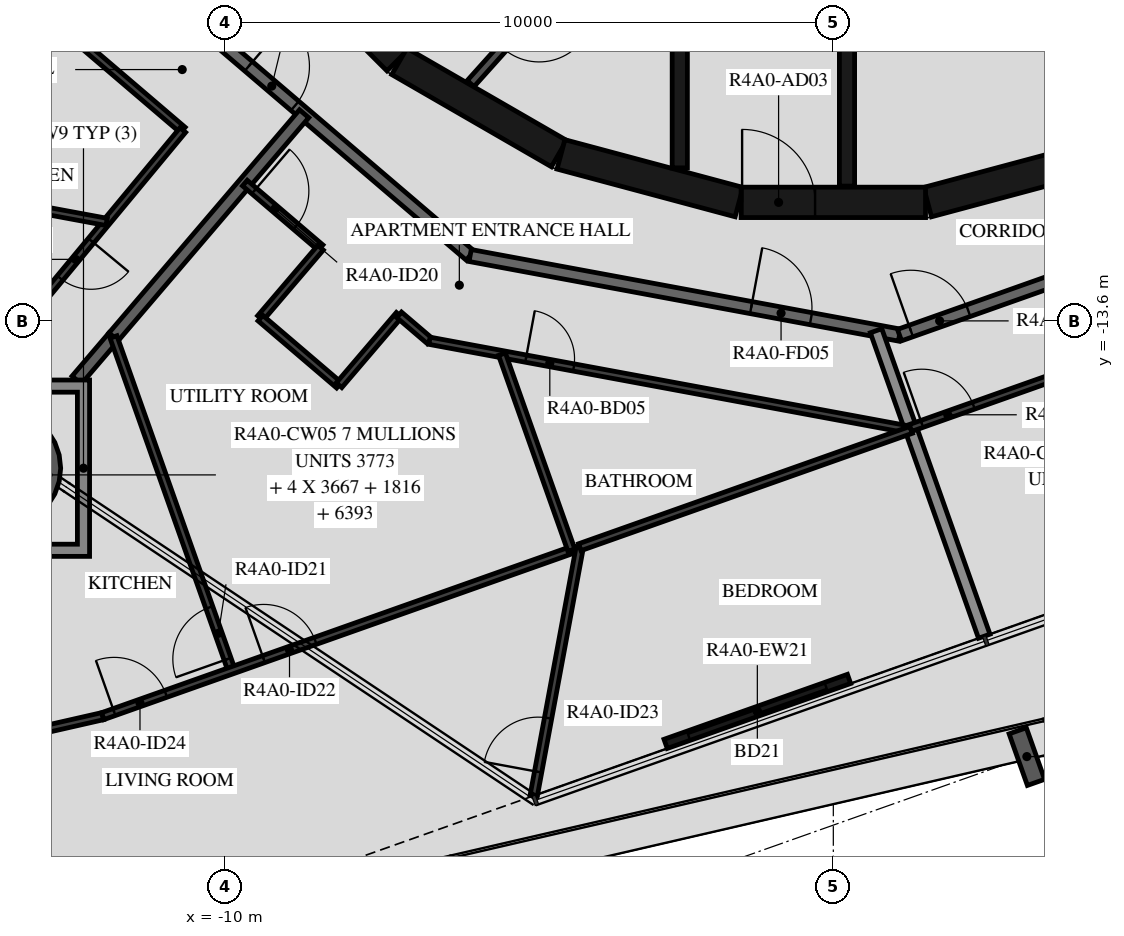
"""IFC4 building model, lengths in metres.
Left out: names, types, materials, properties, quantities, classifications, styles, units other than length and angle.
Written with IfcOpenShell. Run it as: python <this file> out.ifc"""

import sys

from ifc_helpers import new_model, si_unit, direction, frame, frame_2d, origin, origin_2d, place, context, subcontext, project, spatial, polyline, rectangle, hollow_circle, i_section, outline, extrude, element, fill, save


model = new_model("IFC4")
c1 = context("Model", 3, precision=1e-05, world=origin(), true_north=direction((0.0, 1.0)))
c2 = subcontext(c1, "Body", "Model", "MODEL_VIEW")
j1 = project(units=[si_unit("LENGTHUNIT", "METRE"), si_unit("PLANEANGLEUNIT", "RADIAN")], contexts=[c1])
p1 = place(None, origin())
s1 = spatial("IfcSite", under=j1, at=p1, CompositionType="ELEMENT")
p2 = place(p1, origin())
s2 = spatial("IfcBuilding", under=s1, at=p2, CompositionType="ELEMENT")
p3 = place(p2, frame((0.0, 0.0, 151.7)))
s3 = spatial("IfcBuildingStorey", under=s2, at=p3, CompositionType="ELEMENT", Elevation=151.7)
p4 = place(p3, frame((-13.681, -16.019, -0.45), z_axis=(0.0, 0.0, 1.0), x_axis=(1.0, 0.0, 0.0)))
e1 = element("IfcColumn", 1, at=p4, inside=s3, PredefinedType="COLUMN", context=c2, shape_type="SweptSolid", body=[
    extrude(hollow_circle(Radius=0.975, WallThickness=0.045, at=origin_2d()), origin(), (0.0, 0.0, 1.0), 3.57),
])
p5 = place(p3, frame((3.183, -20.761, -0.45), z_axis=(0.0, 0.0, 1.0), x_axis=(-0.942641392079, -0.333807138839, 0.0)))
e2 = element("IfcColumn", 2, at=p5, inside=s3, PredefinedType="COLUMN", context=c2, shape_type="SweptSolid", body=[
    extrude(i_section(OverallWidth=0.3, OverallDepth=0.9, WebThickness=0.019, FlangeThickness=0.035, FilletRadius=0.03, at=origin_2d()), origin(), (0.0, 0.0, 1.0), 3.57),
])
p6 = place(p3, frame((-2.758, -20.552, 0.0), z_axis=(0.0, 0.0, 1.0), x_axis=(0.94265323131, 0.333773704029, 0.0)))
e3 = element("IfcWall", 3, at=p6, inside=s3, PredefinedType="STANDARD", context=c2, shape_type="SweptSolid", body=[
    extrude(rectangle(XDim=3.2, YDim=0.16, at=frame_2d((1.6, 0.0))), origin(), (0.0, 0.0, 1.0), 3.12),
])
p7 = place(p6, frame((0.4, 0.0, 0.0)))
e4 = element("IfcOpeningElement", 4, at=p7, cuts=e3, PredefinedType="OPENING", context=c2, shape_type="SweptSolid", body=[
    extrude(rectangle(XDim=2.4, YDim=2.4, at=frame_2d((1.2, 1.2))), frame((0.0, 0.09, 0.0), z_axis=(0.0, -1.0, 0.0), x_axis=(1.0, 0.0, 0.0)), (0.0, 0.0, 1.0), 0.18),
])
p8 = place(p3, frame((1.55, -11.643, 0.0), z_axis=(0.0, 0.0, 1.0), x_axis=(0.965948410781, 0.258734743916, 0.0)))
e5 = element("IfcWall", 5, at=p8, inside=s3, PredefinedType="SHEAR", context=c2, shape_type="SweptSolid", body=[
    extrude(rectangle(XDim=3.033, YDim=0.5, at=frame_2d((1.516, 0.0))), origin(), (0.0, 0.0, 1.0), 3.12),
])
p9 = place(p3, frame((-9.308, -7.164, 0.0), z_axis=(0.0, 0.0, 1.0), x_axis=(0.707106781187, -0.707106781187, 0.0)))
e6 = element("IfcWall", 6, at=p9, inside=s3, PredefinedType="SHEAR", context=c2, shape_type="SweptSolid", body=[
    extrude(rectangle(XDim=3.032, YDim=0.5, at=frame_2d((1.516, 0.0))), origin(), (0.0, 0.0, 1.0), 3.12),
])
for number, where, z_axis, x_axis in (
    (7, (-7.137, -9.329, 0.0), (0.0, 0.0, 1.0), (0.866, -0.5, 0.0)),
    (8, (-4.479, -10.858, 0.0), (0.0, 0.0, 1.0), (0.966, -0.259, 0.0)),
):
    element("IfcWall", number, at=place(p3, frame(where, z_axis=z_axis, x_axis=x_axis)), inside=s3, PredefinedType="SHEAR", context=c2, shape_type="SweptSolid", body=[
        extrude(rectangle(XDim=3.033, YDim=0.5, at=frame_2d((1.516, 0.0))), origin(), (0.0, 0.0, 1.0), 3.12),
    ])
p10 = place(p3, frame((-1.516, -11.647, 0.0), z_axis=(0.0, 0.0, 1.0), x_axis=(1.0, 0.0, 0.0)))
e9 = element("IfcWall", 9, at=p10, inside=s3, PredefinedType="SHEAR", context=c2, shape_type="SweptSolid", body=[
    extrude(rectangle(XDim=3.033, YDim=0.5, at=frame_2d((1.516, 0.0))), origin(), (0.0, 0.0, 1.0), 3.12),
])
p11 = place(p10, frame((0.016, 0.0, 0.0)))
e10 = element("IfcOpeningElement", 10, at=p11, cuts=e9, PredefinedType="OPENING", context=c2, shape_type="SweptSolid", body=[
    extrude(rectangle(XDim=1.2, YDim=2.1, at=frame_2d((0.6, 1.05))), frame((0.0, 0.26, 0.0), z_axis=(0.0, -1.0, 0.0), x_axis=(1.0, 0.0, 0.0)), (0.0, 0.0, 1.0), 0.52),
])
p12 = place(p3, frame((-2.525, -8.97, 0.0), z_axis=(0.0, 0.0, 1.0), x_axis=(0.0, -1.0, 0.0)))
e11 = element("IfcWall", 11, at=p12, inside=s3, PredefinedType="SHEAR", context=c2, shape_type="SweptSolid", body=[
    extrude(rectangle(XDim=2.11, YDim=0.25, at=frame_2d((1.055, 0.0))), origin(), (0.0, 0.0, 1.0), 3.12),
])
p13 = place(p3, frame((0.225, -8.97, 0.0), z_axis=(0.0, 0.0, 1.0), x_axis=(0.0, -1.0, 0.0)))
e12 = element("IfcWall", 12, at=p13, inside=s3, PredefinedType="SHEAR", context=c2, shape_type="SweptSolid", body=[
    extrude(rectangle(XDim=2.41, YDim=0.25, at=frame_2d((1.205, 0.0))), origin(), (0.0, 0.0, 1.0), 3.12),
])
p14 = place(p3, frame((-4.311, -7.851, 0.0), z_axis=(0.0, 0.0, 1.0), x_axis=(-0.667869133096, -0.744278725383, 0.0)))
e13 = element("IfcWall", 13, at=p14, inside=s3, PredefinedType="PARTITIONING", context=c2, shape_type="SweptSolid", body=[
    extrude(rectangle(XDim=2.476, YDim=0.15, at=frame_2d((1.238, 0.0))), origin(), (0.0, 0.0, 1.0), 3.12),
])
p15 = place(p14, frame((0.788, 0.0, 0.0)))
e14 = element("IfcOpeningElement", 14, at=p15, cuts=e13, PredefinedType="OPENING", context=c2, shape_type="SweptSolid", body=[
    extrude(rectangle(XDim=0.9, YDim=2.1, at=frame_2d((0.45, 1.05))), frame((0.0, 0.085, 0.0), z_axis=(0.0, -1.0, 0.0), x_axis=(1.0, 0.0, 0.0)), (0.0, 0.0, 1.0), 0.17),
])
p16 = place(p3, frame((-11.433, -7.858, 0.0), z_axis=(0.0, 0.0, 1.0), x_axis=(0.760412154545, -0.649440801937, 0.0)))
e15 = element("IfcWall", 15, at=p16, inside=s3, PredefinedType="STANDARD", context=c2, shape_type="SweptSolid", body=[
    extrude(rectangle(XDim=7.181, YDim=0.2, at=frame_2d((3.59, 0.0))), origin(), (0.0, 0.0, 1.0), 3.12),
])
p17 = place(p16, frame((2.39, 0.0, 0.0)))
e16 = element("IfcOpeningElement", 16, at=p17, cuts=e15, PredefinedType="OPENING", context=c2, shape_type="SweptSolid", body=[
    extrude(rectangle(XDim=1.0, YDim=2.1, at=frame_2d((0.5, 1.05))), frame((0.0, 0.11, 0.0), z_axis=(0.0, -1.0, 0.0), x_axis=(1.0, 0.0, 0.0)), (0.0, 0.0, 1.0), 0.22),
])
p18 = place(p3, frame((-5.972, -12.521, 0.0), z_axis=(0.0, 0.0, 1.0), x_axis=(0.983256068163, -0.18222926335, 0.0)))
e17 = element("IfcWall", 17, at=p18, inside=s3, PredefinedType="STANDARD", context=c2, shape_type="SweptSolid", body=[
    extrude(rectangle(XDim=7.181, YDim=0.2, at=frame_2d((3.59, 0.0))), origin(), (0.0, 0.0, 1.0), 3.12),
])
p19 = place(p18, frame((4.7, 0.0, 0.0)))
e18 = element("IfcOpeningElement", 18, at=p19, cuts=e17, PredefinedType="OPENING", context=c2, shape_type="SweptSolid", body=[
    extrude(rectangle(XDim=1.0, YDim=2.1, at=frame_2d((0.5, 1.05))), frame((0.0, 0.11, 0.0), z_axis=(0.0, -1.0, 0.0), x_axis=(1.0, 0.0, 0.0)), (0.0, 0.0, 1.0), 0.22),
])
p20 = place(p3, frame((1.088, -13.83, 0.0), z_axis=(0.0, 0.0, 1.0), x_axis=(0.942648397945, 0.333787354241, 0.0)))
e19 = element("IfcWall", 19, at=p20, inside=s3, PredefinedType="STANDARD", context=c2, shape_type="SweptSolid", body=[
    extrude(rectangle(XDim=7.181, YDim=0.2, at=frame_2d((3.591, 0.0))), origin(), (0.0, 0.0, 1.0), 3.12),
])
p21 = place(p20, frame((0.2, 0.0, 0.0)))
e20 = element("IfcOpeningElement", 20, at=p21, cuts=e19, PredefinedType="OPENING", context=c2, shape_type="SweptSolid", body=[
    extrude(rectangle(XDim=1.0, YDim=2.1, at=frame_2d((0.5, 1.05))), frame((0.0, 0.11, 0.0), z_axis=(0.0, -1.0, 0.0), x_axis=(1.0, 0.0, 0.0)), (0.0, 0.0, 1.0), 0.22),
])
p22 = place(p3, frame((-11.838, -13.86, 0.0), z_axis=(0.0, 0.0, 1.0), x_axis=(0.64944503311, 0.760408540831, 0.0)))
e21 = element("IfcWall", 21, at=p22, inside=s3, PredefinedType="STANDARD", context=c2, shape_type="SweptSolid", body=[
    extrude(rectangle(XDim=4.827, YDim=0.2, at=frame_2d((2.414, 0.0))), origin(), (0.0, 0.0, 1.0), 3.12),
])
p23 = place(p3, frame((-12.443, -14.569, 0.0), z_axis=(0.0, 0.0, 1.0), x_axis=(0.649517408851, 0.760346720648, 0.0)))
e22 = element("IfcWall", 22, at=p23, inside=s3, PredefinedType="STANDARD", context=c2, shape_type="SweptSolid", body=[
    extrude(rectangle(XDim=0.932, YDim=0.2, at=frame_2d((0.466, 0.0))), origin(), (0.0, 0.0, 1.0), 3.12),
])
p24 = place(p3, frame((2.482, -18.782, 0.0), z_axis=(0.0, 0.0, 1.0), x_axis=(-0.333807281402, 0.942641341594, 0.0)))
e23 = element("IfcWall", 23, at=p24, inside=s3, PredefinedType="STANDARD", context=c2, shape_type="SweptSolid", body=[
    extrude(rectangle(XDim=5.329, YDim=0.2, at=frame_2d((2.665, 0.0))), origin(), (0.0, 0.0, 1.0), 2.73),
])
p25 = place(p3, frame((-12.713, -8.737, 0.0), z_axis=(0.0, 0.0, 1.0), x_axis=(0.760400223405, -0.649454771517, 0.0)))
e24 = element("IfcWall", 24, at=p25, inside=s3, PredefinedType="PARTITIONING", context=c2, shape_type="SweptSolid", body=[
    extrude(rectangle(XDim=2.649, YDim=0.12, at=frame_2d((1.325, 0.0))), origin(), (0.0, 0.0, 1.0), 3.12),
])
p26 = place(p3, frame((-10.698, -10.458, 0.0), z_axis=(0.0, 0.0, 1.0), x_axis=(-0.63830561059, -0.769783052223, 0.0)))
e25 = element("IfcWall", 25, at=p26, inside=s3, PredefinedType="PARTITIONING", context=c2, shape_type="SweptSolid", body=[
    extrude(rectangle(XDim=5.131, YDim=0.12, at=frame_2d((2.565, 0.0))), origin(), (0.0, 0.0, 1.0), 3.12),
])
p27 = place(p26, frame((2.363, 0.0, 0.0)))
e26 = element("IfcOpeningElement", 26, at=p27, cuts=e25, PredefinedType="OPENING", context=c2, shape_type="SweptSolid", body=[
    extrude(rectangle(XDim=0.8, YDim=2.1, at=frame_2d((0.4, 1.05))), frame((0.0, 0.07, 0.0), z_axis=(0.0, -1.0, 0.0), x_axis=(1.0, 0.0, 0.0)), (0.0, 0.0, 1.0), 0.14),
])
p28 = place(p3, frame((-14.865, -11.428, 0.0), z_axis=(0.0, 0.0, 1.0), x_axis=(0.983255224962, -0.182233812955, 0.0)))
e27 = element("IfcWall", 27, at=p28, inside=s3, PredefinedType="PARTITIONING", context=c2, shape_type="SweptSolid", body=[
    extrude(rectangle(XDim=2.963, YDim=0.12, at=frame_2d((1.482, 0.0))), origin(), (0.0, 0.0, 1.0), 3.12),
])
p29 = place(p3, frame((-9.677, -11.33, 0.0), z_axis=(0.0, 0.0, 1.0), x_axis=(0.760372142735, -0.649487647729, 0.0)))
e28 = element("IfcWall", 28, at=p29, inside=s3, PredefinedType="PARTITIONING", context=c2, shape_type="SweptSolid", body=[
    extrude(rectangle(XDim=1.636, YDim=0.12, at=frame_2d((0.818, 0.0))), origin(), (0.0, 0.0, 1.0), 3.12),
])
p30 = place(p29, frame((0.2, 0.0, 0.0)))
e29 = element("IfcOpeningElement", 29, at=p30, cuts=e28, PredefinedType="OPENING", context=c2, shape_type="SweptSolid", body=[
    extrude(rectangle(XDim=0.9, YDim=2.1, at=frame_2d((0.45, 1.05))), frame((0.0, 0.07, 0.0), z_axis=(0.0, -1.0, 0.0), x_axis=(1.0, 0.0, 0.0)), (0.0, 0.0, 1.0), 0.14),
])
p31 = place(p3, frame((-8.433, -12.393, 0.0), z_axis=(0.0, 0.0, 1.0), x_axis=(-0.649443355674, -0.760409973482, 0.0)))
e30 = element("IfcWall", 30, at=p31, inside=s3, PredefinedType="PARTITIONING", context=c2, shape_type="SweptSolid", body=[
    extrude(rectangle(XDim=1.522, YDim=0.12, at=frame_2d((0.761, 0.0))), origin(), (0.0, 0.0, 1.0), 3.12),
])
p32 = place(p3, frame((-9.422, -13.55, 0.0), z_axis=(0.0, 0.0, 1.0), x_axis=(0.760431300628, -0.649418383652, 0.0)))
e31 = element("IfcWall", 31, at=p32, inside=s3, PredefinedType="PARTITIONING", context=c2, shape_type="SweptSolid", body=[
    extrude(rectangle(XDim=1.7, YDim=0.12, at=frame_2d((0.85, 0.0))), origin(), (0.0, 0.0, 1.0), 3.12),
])
p33 = place(p3, frame((-8.129, -14.654, 0.0), z_axis=(0.0, 0.0, 1.0), x_axis=(0.649443355674, 0.760409973482, 0.0)))
e32 = element("IfcWall", 32, at=p33, inside=s3, PredefinedType="PARTITIONING", context=c2, shape_type="SweptSolid", body=[
    extrude(rectangle(XDim=1.522, YDim=0.12, at=frame_2d((0.761, 0.0))), origin(), (0.0, 0.0, 1.0), 3.12),
])
p34 = place(p3, frame((-7.14, -13.497, 0.0), z_axis=(0.0, 0.0, 1.0), x_axis=(0.760515230334, -0.649320093967, 0.0)))
e33 = element("IfcWall", 33, at=p34, inside=s3, PredefinedType="PARTITIONING", context=c2, shape_type="SweptSolid", body=[
    extrude(rectangle(XDim=0.656, YDim=0.12, at=frame_2d((0.328, 0.0))), origin(), (0.0, 0.0, 1.0), 3.12),
])
p35 = place(p3, frame((-6.641, -13.923, 0.0), z_axis=(0.0, 0.0, 1.0), x_axis=(0.983250157272, -0.182261153912, 0.0)))
e34 = element("IfcWall", 34, at=p35, inside=s3, PredefinedType="PARTITIONING", context=c2, shape_type="SweptSolid", body=[
    extrude(rectangle(XDim=7.985, YDim=0.12, at=frame_2d((3.992, 0.0))), origin(), (0.0, 0.0, 1.0), 3.12),
])
p36 = place(p35, frame((1.612, 0.0, 0.0)))
e35 = element("IfcOpeningElement", 35, at=p36, cuts=e34, PredefinedType="OPENING", context=c2, shape_type="SweptSolid", body=[
    extrude(rectangle(XDim=0.8, YDim=2.1, at=frame_2d((0.4, 1.05))), frame((0.0, 0.07, 0.0), z_axis=(0.0, -1.0, 0.0), x_axis=(1.0, 0.0, 0.0)), (0.0, 0.0, 1.0), 0.14),
])
p37 = place(p3, frame((-9.895, -19.346, 0.0), z_axis=(0.0, 0.0, 1.0), x_axis=(-0.333781129158, 0.942650602195, 0.0)))
e36 = element("IfcWall", 36, at=p37, inside=s3, PredefinedType="PARTITIONING", context=c2, shape_type="SweptSolid", body=[
    extrude(rectangle(XDim=5.819, YDim=0.12, at=frame_2d((2.91, 0.0))), origin(), (0.0, 0.0, 1.0), 3.12),
])
p38 = place(p37, frame((0.2, 0.0, 0.0)))
e37 = element("IfcOpeningElement", 37, at=p38, cuts=e36, PredefinedType="OPENING", context=c2, shape_type="SweptSolid", body=[
    extrude(rectangle(XDim=0.9, YDim=2.1, at=frame_2d((0.45, 1.05))), frame((0.0, 0.07, 0.0), z_axis=(0.0, -1.0, 0.0), x_axis=(1.0, 0.0, 0.0)), (0.0, 0.0, 1.0), 0.14),
])
p39 = place(p3, frame((-13.211, -20.369, 0.0), z_axis=(0.0, 0.0, 1.0), x_axis=(0.974997834831, 0.222214360642, 0.0)))
e38 = element("IfcWall", 38, at=p39, inside=s3, PredefinedType="PARTITIONING", context=c2, shape_type="SweptSolid", body=[
    extrude(rectangle(XDim=1.227, YDim=0.12, at=frame_2d((0.614, 0.0))), origin(), (0.0, 0.0, 1.0), 3.12),
])
p40 = place(p3, frame((-12.015, -20.096, 0.0), z_axis=(0.0, 0.0, 1.0), x_axis=(0.942638718556, 0.333814688531, 0.0)))
e39 = element("IfcWall", 39, at=p40, inside=s3, PredefinedType="PARTITIONING", context=c2, shape_type="SweptSolid", body=[
    extrude(rectangle(XDim=8.216, YDim=0.12, at=frame_2d((4.108, 0.0))), origin(), (0.0, 0.0, 1.0), 3.12),
])
p41 = place(p40, frame((2.809, 0.0, 0.0)))
e40 = element("IfcOpeningElement", 40, at=p41, cuts=e39, PredefinedType="OPENING", context=c2, shape_type="SweptSolid", body=[
    extrude(rectangle(XDim=0.9, YDim=2.1, at=frame_2d((0.45, 1.05))), frame((0.0, 0.07, 0.0), z_axis=(0.0, -1.0, 0.0), x_axis=(1.0, 0.0, 0.0)), (0.0, 0.0, 1.0), 0.14),
])
p42 = place(p40, frame((0.2, 0.0, 0.0)))
e41 = element("IfcOpeningElement", 41, at=p42, cuts=e39, PredefinedType="OPENING", context=c2, shape_type="SweptSolid", body=[
    extrude(rectangle(XDim=0.9, YDim=2.1, at=frame_2d((0.45, 1.05))), frame((0.0, 0.07, 0.0), z_axis=(0.0, -1.0, 0.0), x_axis=(1.0, 0.0, 0.0)), (0.0, 0.0, 1.0), 0.14),
])
p43 = place(p3, frame((-4.308, -17.367, 0.0), z_axis=(0.0, 0.0, 1.0), x_axis=(-0.333802202677, 0.942643140052, 0.0)))
e42 = element("IfcWall", 42, at=p43, inside=s3, PredefinedType="PARTITIONING", context=c2, shape_type="SweptSolid", body=[
    extrude(rectangle(XDim=3.419, YDim=0.12, at=frame_2d((1.709, 0.0))), origin(), (0.0, 0.0, 1.0), 3.12),
])
p44 = place(p3, frame((-4.927, -21.406, 0.0), z_axis=(0.0, 0.0, 1.0), x_axis=(0.182238575099, 0.983254342348, 0.0)))
e43 = element("IfcWall", 43, at=p44, inside=s3, PredefinedType="PARTITIONING", context=c2, shape_type="SweptSolid", body=[
    extrude(rectangle(XDim=4.157, YDim=0.12, at=frame_2d((2.079, 0.0))), origin(), (0.0, 0.0, 1.0), 3.12),
])
p45 = place(p44, frame((0.4, 0.0, 0.0)))
e44 = element("IfcOpeningElement", 44, at=p45, cuts=e43, PredefinedType="OPENING", context=c2, shape_type="SweptSolid", body=[
    extrude(rectangle(XDim=0.9, YDim=2.1, at=frame_2d((0.45, 1.05))), frame((0.0, 0.07, 0.0), z_axis=(0.0, -1.0, 0.0), x_axis=(1.0, 0.0, 0.0)), (0.0, 0.0, 1.0), 0.14),
])
p46 = place(p3, frame((-4.17, -17.318, 0.0), z_axis=(0.0, 0.0, 1.0), x_axis=(0.942641343532, 0.333807275931, 0.0)))
e45 = element("IfcWall", 45, at=p46, inside=s3, PredefinedType="PARTITIONING", context=c2, shape_type="SweptSolid", body=[
    extrude(rectangle(XDim=5.781, YDim=0.12, at=frame_2d((2.891, 0.0))), origin(), (0.0, 0.0, 1.0), 3.12),
])
p47 = place(p3, frame((1.269, -15.357, 0.0), z_axis=(0.0, 0.0, 1.0), x_axis=(0.942639442898, 0.333812643101, 0.0)))
e46 = element("IfcWall", 46, at=p47, inside=s3, PredefinedType="PARTITIONING", context=c2, shape_type="SweptSolid", body=[
    extrude(rectangle(XDim=7.86, YDim=0.12, at=frame_2d((3.93, 0.0))), origin(), (0.0, 0.0, 1.0), 3.12),
])
p48 = place(p47, frame((0.2, 0.0, 0.0)))
e47 = element("IfcOpeningElement", 47, at=p48, cuts=e46, PredefinedType="OPENING", context=c2, shape_type="SweptSolid", body=[
    extrude(rectangle(XDim=0.9, YDim=2.1, at=frame_2d((0.45, 1.05))), frame((0.0, 0.07, 0.0), z_axis=(0.0, -1.0, 0.0), x_axis=(1.0, 0.0, 0.0)), (0.0, 0.0, 1.0), 0.14),
])
p49 = place(p3, origin())
e48 = element("IfcWall", 48, at=p49, inside=s3, PredefinedType="STANDARD", context=c2, shape_type="SweptSolid", body=[
    extrude(outline(polyline([(-12.231, -14.569), (-12.231, -17.469), (-15.131, -17.469), (-15.131, -14.569), (-12.231, -14.569)]), holes=[polyline([(-14.931, -17.269), (-12.431, -17.269), (-12.431, -14.769), (-14.931, -14.769), (-14.931, -17.269)])]), origin(), (0.0, 0.0, 1.0), 3.12),
])
p50 = place(p7, origin())
e49 = element("IfcDoor", 49, at=p50, inside=s3, OperationType="DOUBLE_DOOR_SLIDING", PredefinedType="DOOR", context=c2, shape_type="SweptSolid", body=[
    extrude(rectangle(XDim=2.4, YDim=2.4, at=frame_2d((1.2, 1.2))), frame((0.0, 0.025, 0.0), z_axis=(0.0, -1.0, 0.0), x_axis=(1.0, 0.0, 0.0)), (0.0, 0.0, 1.0), 0.05),
])
fill(e4, e49)
p51 = place(p11, origin())
e50 = element("IfcDoor", 50, at=p51, inside=s3, OperationType="SINGLE_SWING_RIGHT", PredefinedType="DOOR", context=c2, shape_type="SweptSolid", body=[
    extrude(rectangle(XDim=1.2, YDim=2.1, at=frame_2d((0.6, 1.05))), frame((0.0, 0.025, 0.0), z_axis=(0.0, -1.0, 0.0), x_axis=(1.0, 0.0, 0.0)), (0.0, 0.0, 1.0), 0.05),
])
fill(e10, e50)
p52 = place(p17, origin())
e51 = element("IfcDoor", 51, at=p52, inside=s3, OperationType="SINGLE_SWING_RIGHT", PredefinedType="DOOR", context=c2, shape_type="SweptSolid", body=[
    extrude(rectangle(XDim=1.0, YDim=2.1, at=frame_2d((0.5, 1.05))), frame((0.0, 0.025, 0.0), z_axis=(0.0, -1.0, 0.0), x_axis=(1.0, 0.0, 0.0)), (0.0, 0.0, 1.0), 0.05),
])
fill(e16, e51)
p53 = place(p27, origin())
e52 = element("IfcDoor", 52, at=p53, inside=s3, OperationType="SINGLE_SWING_RIGHT", PredefinedType="DOOR", context=c2, shape_type="SweptSolid", body=[
    extrude(rectangle(XDim=0.8, YDim=2.1, at=frame_2d((0.4, 1.05))), frame((0.0, 0.025, 0.0), z_axis=(0.0, -1.0, 0.0), x_axis=(1.0, 0.0, 0.0)), (0.0, 0.0, 1.0), 0.05),
])
fill(e26, e52)
p54 = place(p19, origin())
e53 = element("IfcDoor", 53, at=p54, inside=s3, OperationType="SINGLE_SWING_LEFT", PredefinedType="DOOR", context=c2, shape_type="SweptSolid", body=[
    extrude(rectangle(XDim=1.0, YDim=2.1, at=frame_2d((0.5, 1.05))), frame((0.0, 0.025, 0.0), z_axis=(0.0, -1.0, 0.0), x_axis=(1.0, 0.0, 0.0)), (0.0, 0.0, 1.0), 0.05),
])
fill(e18, e53)
p55 = place(p30, origin())
e54 = element("IfcDoor", 54, at=p55, inside=s3, OperationType="SINGLE_SWING_LEFT", PredefinedType="DOOR", context=c2, shape_type="SweptSolid", body=[
    extrude(rectangle(XDim=0.9, YDim=2.1, at=frame_2d((0.45, 1.05))), frame((0.0, 0.025, 0.0), z_axis=(0.0, -1.0, 0.0), x_axis=(1.0, 0.0, 0.0)), (0.0, 0.0, 1.0), 0.05),
])
fill(e29, e54)
p56 = place(p36, origin())
e55 = element("IfcDoor", 55, at=p56, inside=s3, OperationType="SINGLE_SWING_LEFT", PredefinedType="DOOR", context=c2, shape_type="SweptSolid", body=[
    extrude(rectangle(XDim=0.8, YDim=2.1, at=frame_2d((0.4, 1.05))), frame((0.0, 0.025, 0.0), z_axis=(0.0, -1.0, 0.0), x_axis=(1.0, 0.0, 0.0)), (0.0, 0.0, 1.0), 0.05),
])
fill(e35, e55)
p57 = place(p38, origin())
e56 = element("IfcDoor", 56, at=p57, inside=s3, OperationType="SINGLE_SWING_LEFT", PredefinedType="DOOR", context=c2, shape_type="SweptSolid", body=[
    extrude(rectangle(XDim=0.9, YDim=2.1, at=frame_2d((0.45, 1.05))), frame((0.0, 0.025, 0.0), z_axis=(0.0, -1.0, 0.0), x_axis=(1.0, 0.0, 0.0)), (0.0, 0.0, 1.0), 0.05),
])
fill(e37, e56)
p58 = place(p41, origin())
e57 = element("IfcDoor", 57, at=p58, inside=s3, OperationType="SINGLE_SWING_LEFT", PredefinedType="DOOR", context=c2, shape_type="SweptSolid", body=[
    extrude(rectangle(XDim=0.9, YDim=2.1, at=frame_2d((0.45, 1.05))), frame((0.0, 0.025, 0.0), z_axis=(0.0, -1.0, 0.0), x_axis=(1.0, 0.0, 0.0)), (0.0, 0.0, 1.0), 0.05),
])
fill(e40, e57)
p59 = place(p45, origin())
e58 = element("IfcDoor", 58, at=p59, inside=s3, OperationType="SINGLE_SWING_RIGHT", PredefinedType="DOOR", context=c2, shape_type="SweptSolid", body=[
    extrude(rectangle(XDim=0.9, YDim=2.1, at=frame_2d((0.45, 1.05))), frame((0.0, 0.025, 0.0), z_axis=(0.0, -1.0, 0.0), x_axis=(1.0, 0.0, 0.0)), (0.0, 0.0, 1.0), 0.05),
])
fill(e44, e58)
p60 = place(p42, origin())
e59 = element("IfcDoor", 59, at=p60, inside=s3, OperationType="SINGLE_SWING_LEFT", PredefinedType="DOOR", context=c2, shape_type="SweptSolid", body=[
    extrude(rectangle(XDim=0.9, YDim=2.1, at=frame_2d((0.45, 1.05))), frame((0.0, 0.025, 0.0), z_axis=(0.0, -1.0, 0.0), x_axis=(1.0, 0.0, 0.0)), (0.0, 0.0, 1.0), 0.05),
])
fill(e41, e59)
p61 = place(p21, origin())
e60 = element("IfcDoor", 60, at=p61, inside=s3, OperationType="SINGLE_SWING_LEFT", PredefinedType="DOOR", context=c2, shape_type="SweptSolid", body=[
    extrude(rectangle(XDim=1.0, YDim=2.1, at=frame_2d((0.5, 1.05))), frame((0.0, 0.025, 0.0), z_axis=(0.0, -1.0, 0.0), x_axis=(1.0, 0.0, 0.0)), (0.0, 0.0, 1.0), 0.05),
])
fill(e20, e60)
p62 = place(p48, origin())
e61 = element("IfcDoor", 61, at=p62, inside=s3, OperationType="SINGLE_SWING_LEFT", PredefinedType="DOOR", context=c2, shape_type="SweptSolid", body=[
    extrude(rectangle(XDim=0.9, YDim=2.1, at=frame_2d((0.45, 1.05))), frame((0.0, 0.025, 0.0), z_axis=(0.0, -1.0, 0.0), x_axis=(1.0, 0.0, 0.0)), (0.0, 0.0, 1.0), 0.05),
])
fill(e47, e61)
save(model, sys.argv[1])
